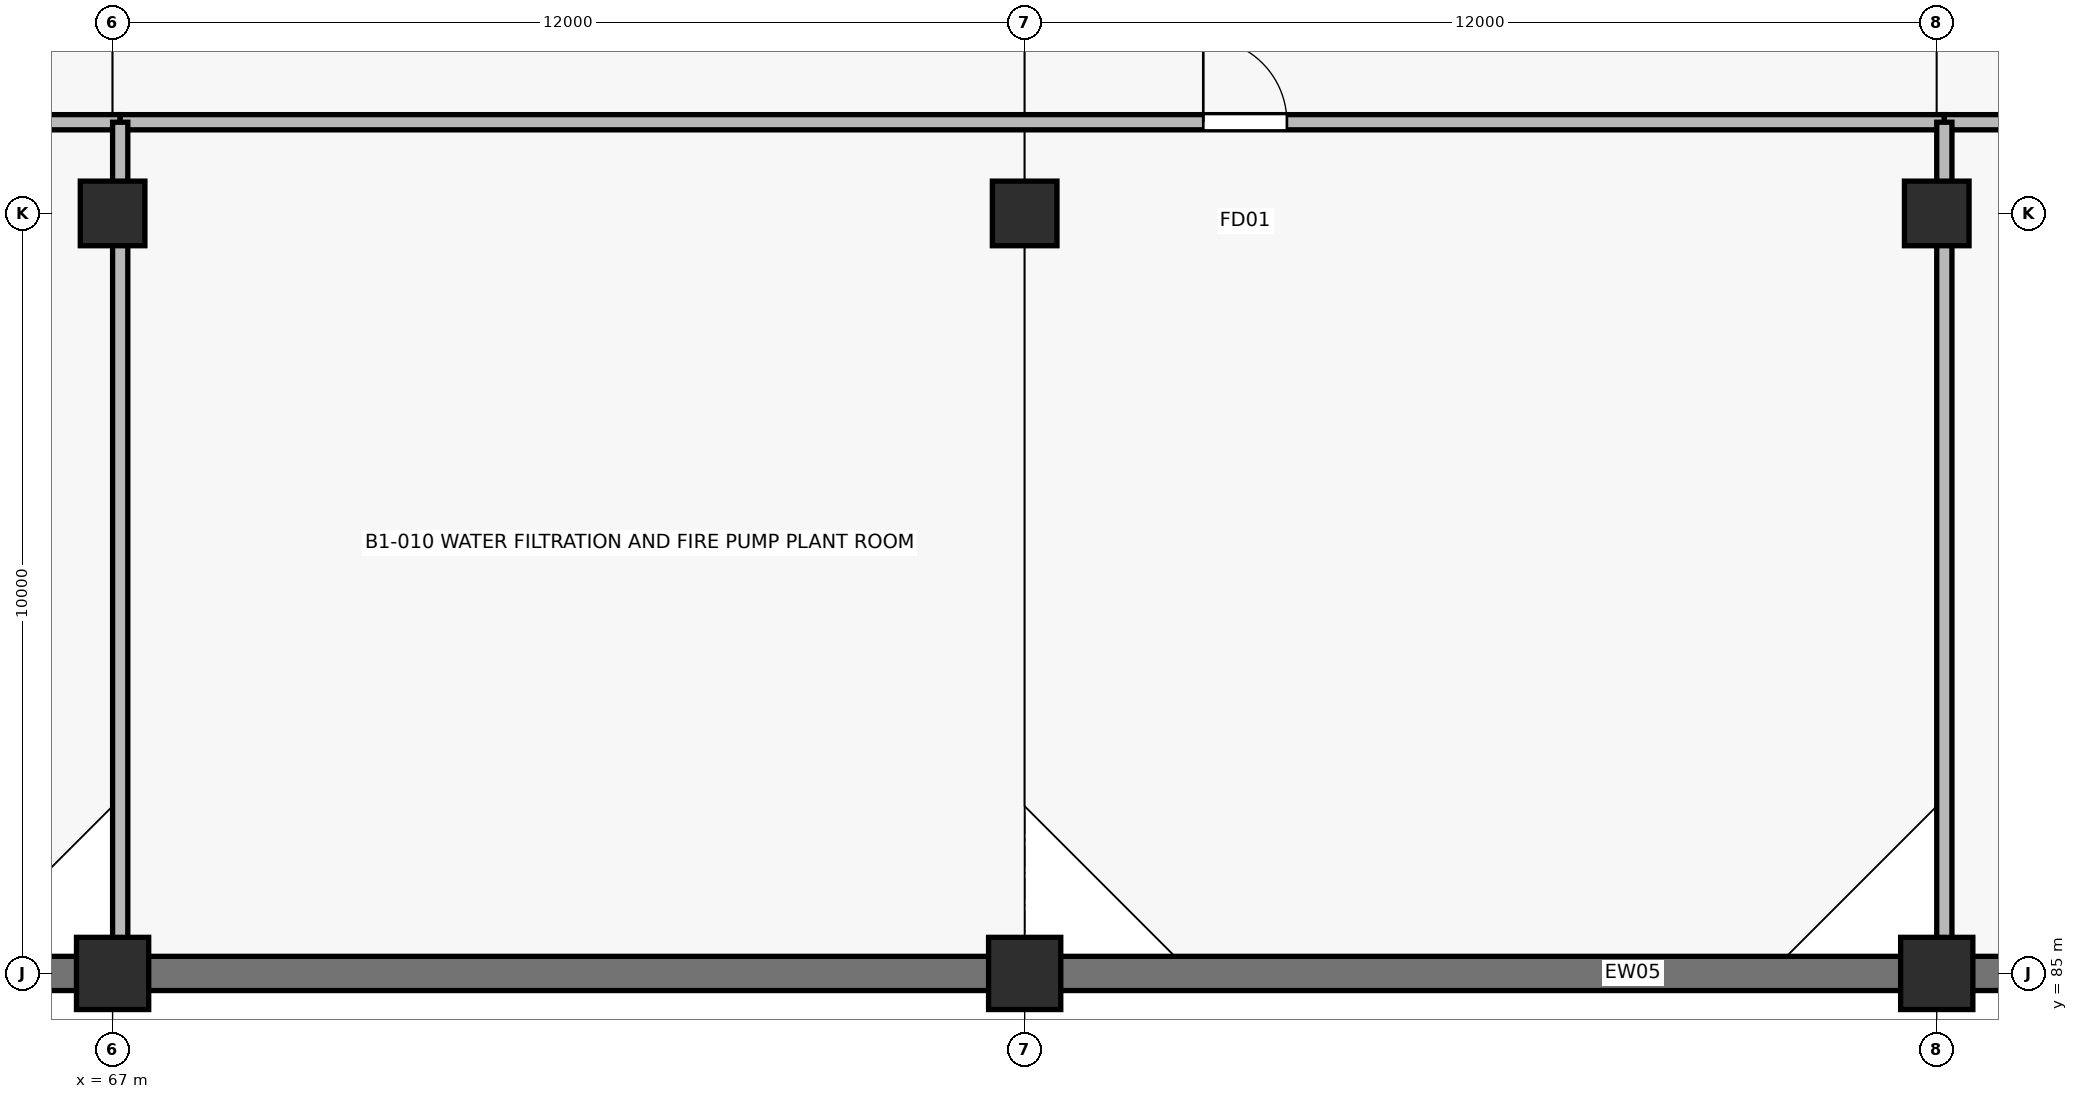
"""IFC4 building model, lengths in metres.
Left out: names, types, materials, properties, quantities, classifications, styles, units other than length and angle.
Written with IfcOpenShell. Run it as: python <this file> out.ifc"""

import sys

from ifc_helpers import new_model, si_unit, direction, frame, frame_2d, origin, origin_2d, place, context, subcontext, project, spatial, rectangle, extrude, element, fill, save


model = new_model("IFC4")
c1 = context("Model", 3, precision=1e-05, world=origin(), true_north=direction((0.0, 1.0)))
c2 = subcontext(c1, "Body", "Model", "MODEL_VIEW")
j1 = project(units=[si_unit("LENGTHUNIT", "METRE"), si_unit("PLANEANGLEUNIT", "RADIAN")], contexts=[c1])
p1 = place(None, origin())
s1 = spatial("IfcSite", under=j1, at=p1, CompositionType="ELEMENT")
p2 = place(p1, origin())
s2 = spatial("IfcBuilding", under=s1, at=p2, CompositionType="ELEMENT")
p3 = place(p2, frame((0.0, 0.0, -4.5)))
s3 = spatial("IfcBuildingStorey", under=s2, at=p3, CompositionType="ELEMENT", Elevation=-4.5)
p4 = place(p3, frame((67.0, 85.0, 0.0), z_axis=(0.0, 0.0, 1.0), x_axis=(1.0, 0.0, 0.0)))
e1 = element("IfcColumn", 1, at=p4, inside=s3, PredefinedType="COLUMN", context=c2, shape_type="SweptSolid", body=[
    extrude(rectangle(XDim=0.95, YDim=0.95, at=origin_2d()), origin(), (0.0, 0.0, 1.0), 4.5),
])
p5 = place(p3, frame((67.0, 95.0, 0.0), z_axis=(0.0, 0.0, 1.0), x_axis=(1.0, 0.0, 0.0)))
e2 = element("IfcColumn", 2, at=p5, inside=s3, PredefinedType="COLUMN", context=c2, shape_type="SweptSolid", body=[
    extrude(rectangle(XDim=0.85, YDim=0.85, at=origin_2d()), origin(), (0.0, 0.0, 1.0), 4.5),
])
p6 = place(p3, frame((79.0, 85.0, 0.0), z_axis=(0.0, 0.0, 1.0), x_axis=(1.0, 0.0, 0.0)))
e3 = element("IfcColumn", 3, at=p6, inside=s3, PredefinedType="COLUMN", context=c2, shape_type="SweptSolid", body=[
    extrude(rectangle(XDim=0.95, YDim=0.95, at=origin_2d()), origin(), (0.0, 0.0, 1.0), 4.5),
])
p7 = place(p3, frame((79.0, 95.0, 0.0), z_axis=(0.0, 0.0, 1.0), x_axis=(1.0, 0.0, 0.0)))
e4 = element("IfcColumn", 4, at=p7, inside=s3, PredefinedType="COLUMN", context=c2, shape_type="SweptSolid", body=[
    extrude(rectangle(XDim=0.85, YDim=0.85, at=origin_2d()), origin(), (0.0, 0.0, 1.0), 4.5),
])
p8 = place(p3, frame((91.0, 85.0, 0.0), z_axis=(0.0, 0.0, 1.0), x_axis=(1.0, 0.0, 0.0)))
e5 = element("IfcColumn", 5, at=p8, inside=s3, PredefinedType="COLUMN", context=c2, shape_type="SweptSolid", body=[
    extrude(rectangle(XDim=0.95, YDim=0.95, at=origin_2d()), origin(), (0.0, 0.0, 1.0), 4.5),
])
p9 = place(p3, frame((91.0, 95.0, 0.0), z_axis=(0.0, 0.0, 1.0), x_axis=(1.0, 0.0, 0.0)))
e6 = element("IfcColumn", 6, at=p9, inside=s3, PredefinedType="COLUMN", context=c2, shape_type="SweptSolid", body=[
    extrude(rectangle(XDim=0.85, YDim=0.85, at=origin_2d()), origin(), (0.0, 0.0, 1.0), 4.5),
])
p10 = place(p3, frame((131.0, 85.0, 0.0), z_axis=(0.0, 0.0, 1.0), x_axis=(-1.0, 0.0, 0.0)))
e7 = element("IfcWall", 7, at=p10, inside=s3, PredefinedType="SOLIDWALL", context=c2, shape_type="SweptSolid", body=[
    extrude(rectangle(XDim=88.0, YDim=0.45, at=frame_2d((44.0, 0.0))), origin(), (0.0, 0.0, 1.0), 4.5),
])
p11 = place(p3, frame((43.18, 96.2, 0.0), z_axis=(0.0, 0.0, 1.0), x_axis=(1.0, 0.0, 0.0)))
e8 = element("IfcWall", 8, at=p11, inside=s3, PredefinedType="PARTITIONING", context=c2, shape_type="SweptSolid", body=[
    extrude(rectangle(XDim=23.92, YDim=0.2, at=frame_2d((11.96, 0.0))), origin(), (0.0, 0.0, 1.0), 3.275),
])
p12 = place(p11, frame((14.21, 0.0, 0.0)))
e9 = element("IfcOpeningElement", 9, at=p12, cuts=e8, PredefinedType="OPENING", context=c2, shape_type="SweptSolid", body=[
    extrude(rectangle(XDim=1.1, YDim=2.15, at=frame_2d((0.55, 1.075))), frame((0.0, 0.11, 0.0), z_axis=(0.0, -1.0, 0.0), x_axis=(1.0, 0.0, 0.0)), (0.0, 0.0, 1.0), 0.22),
])
p13 = place(p3, frame((67.1, 96.2, 0.0), z_axis=(0.0, 0.0, 1.0), x_axis=(1.0, 0.0, 0.0)))
e10 = element("IfcWall", 10, at=p13, inside=s3, PredefinedType="PARTITIONING", context=c2, shape_type="SweptSolid", body=[
    extrude(rectangle(XDim=24.0, YDim=0.2, at=frame_2d((12.0, 0.0))), origin(), (0.0, 0.0, 1.0), 3.275),
])
p14 = place(p13, frame((14.25, 0.0, 0.0)))
e11 = element("IfcOpeningElement", 11, at=p14, cuts=e10, PredefinedType="OPENING", context=c2, shape_type="SweptSolid", body=[
    extrude(rectangle(XDim=1.1, YDim=2.15, at=frame_2d((0.55, 1.075))), frame((0.0, 0.11, 0.0), z_axis=(0.0, -1.0, 0.0), x_axis=(1.0, 0.0, 0.0)), (0.0, 0.0, 1.0), 0.22),
])
p15 = place(p3, frame((67.1, 85.22, 0.0), z_axis=(0.0, 0.0, 1.0), x_axis=(0.0, 1.0, 0.0)))
e12 = element("IfcWall", 12, at=p15, inside=s3, PredefinedType="PARTITIONING", context=c2, shape_type="SweptSolid", body=[
    extrude(rectangle(XDim=10.98, YDim=0.2, at=frame_2d((5.49, 0.0))), origin(), (0.0, 0.0, 1.0), 3.175),
])
p16 = place(p3, frame((91.1, 96.2, 0.0), z_axis=(0.0, 0.0, 1.0), x_axis=(1.0, 0.0, 0.0)))
e13 = element("IfcWall", 13, at=p16, inside=s3, PredefinedType="PARTITIONING", context=c2, shape_type="SweptSolid", body=[
    extrude(rectangle(XDim=20.0, YDim=0.2, at=frame_2d((10.0, 0.0))), origin(), (0.0, 0.0, 1.0), 3.275),
])
p17 = place(p16, frame((12.25, 0.0, 0.0)))
e14 = element("IfcOpeningElement", 14, at=p17, cuts=e13, PredefinedType="OPENING", context=c2, shape_type="SweptSolid", body=[
    extrude(rectangle(XDim=1.1, YDim=2.15, at=frame_2d((0.55, 1.075))), frame((0.0, 0.11, 0.0), z_axis=(0.0, -1.0, 0.0), x_axis=(1.0, 0.0, 0.0)), (0.0, 0.0, 1.0), 0.22),
])
p18 = place(p3, frame((91.1, 85.22, 0.0), z_axis=(0.0, 0.0, 1.0), x_axis=(0.0, 1.0, 0.0)))
e15 = element("IfcWall", 15, at=p18, inside=s3, PredefinedType="PARTITIONING", context=c2, shape_type="SweptSolid", body=[
    extrude(rectangle(XDim=10.98, YDim=0.2, at=frame_2d((5.49, 0.0))), origin(), (0.0, 0.0, 1.0), 3.175),
])
p19 = place(p14, origin())
e16 = element("IfcDoor", 16, at=p19, inside=s3, OperationType="SINGLE_SWING_LEFT", PredefinedType="DOOR", context=c2, shape_type="SweptSolid", body=[
    extrude(rectangle(XDim=1.1, YDim=2.15, at=frame_2d((0.55, 1.075))), frame((0.0, 0.025, 0.0), z_axis=(0.0, -1.0, 0.0), x_axis=(1.0, 0.0, 0.0)), (0.0, 0.0, 1.0), 0.05),
])
fill(e11, e16)
save(model, sys.argv[1])
